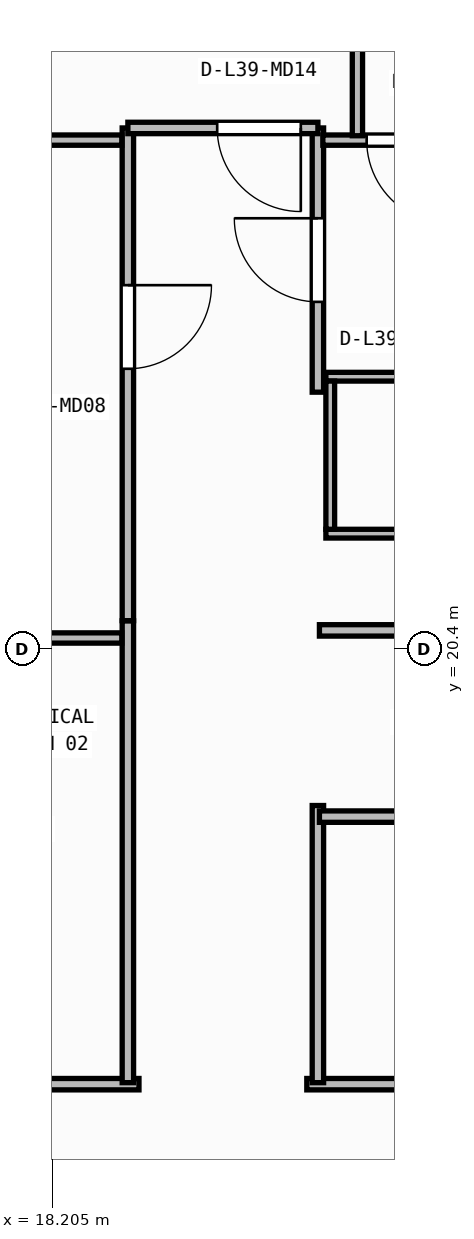
"""IFC4 building model, lengths in metres.
Left out: names, types, materials, properties, quantities, classifications, styles, units other than length and angle.
Written with IfcOpenShell. Run it as: python <this file> out.ifc"""

import sys

from ifc_helpers import new_model, si_unit, direction, frame, frame_2d, origin, place, context, subcontext, project, spatial, rectangle, extrude, element, fill, save


model = new_model("IFC4")
c1 = context("Model", 3, precision=1e-05, world=origin(), true_north=direction((0.0, 1.0)))
c2 = subcontext(c1, "Body", "Model", "MODEL_VIEW")
j1 = project(units=[si_unit("LENGTHUNIT", "METRE"), si_unit("PLANEANGLEUNIT", "RADIAN")], contexts=[c1])
p1 = place(None, origin())
s1 = spatial("IfcSite", under=j1, at=p1, CompositionType="ELEMENT")
p2 = place(p1, origin())
s2 = spatial("IfcBuilding", under=s1, at=p2, CompositionType="ELEMENT")
p3 = place(p2, frame((0.0, 0.0, 158.65)))
s3 = spatial("IfcBuildingStorey", under=s2, at=p3, CompositionType="ELEMENT", Elevation=158.65)
for number, where, z_axis, x_axis in (
    (1, (21.805, 21.923, 0.0), (0.0, 0.0, 1.0), (1.0, 0.0, 0.0)),
    (2, (21.805, 23.988, 0.0), (0.0, 0.0, 1.0), (1.0, 0.0, 0.0)),
):
    element("IfcWall", number, at=place(p3, frame(where, z_axis=z_axis, x_axis=x_axis)), inside=s3, PredefinedType="PARTITIONING", context=c2, shape_type="SweptSolid", body=[
        extrude(rectangle(XDim=2.15, YDim=0.115, at=frame_2d((1.075, 0.0))), origin(), (0.0, 0.0, 1.0), 3.71),
    ])
p4 = place(p3, frame((21.863, 21.98, 0.0), z_axis=(0.0, 0.0, 1.0), x_axis=(0.0, 1.0, 0.0)))
e3 = element("IfcWall", 3, at=p4, inside=s3, PredefinedType="PARTITIONING", context=c2, shape_type="SweptSolid", body=[
    extrude(rectangle(XDim=1.95, YDim=0.115, at=frame_2d((0.975, 0.0))), origin(), (0.0, 0.0, 1.0), 3.71),
])
p5 = place(p3, frame((19.346, 14.68, 0.0), z_axis=(0.0, 0.0, 1.0), x_axis=(-1.0, 0.0, 0.0)))
e4 = element("IfcWall", 4, at=p5, inside=s3, PredefinedType="PARTITIONING", context=c2, shape_type="SweptSolid", body=[
    extrude(rectangle(XDim=5.048, YDim=0.15, at=frame_2d((2.524, 0.0))), origin(), (0.0, 0.0, 1.0), 3.71),
])
p6 = place(p5, frame((1.974, 0.0, 0.0)))
e5 = element("IfcOpeningElement", 5, at=p6, cuts=e4, PredefinedType="OPENING", context=c2, shape_type="SweptSolid", body=[
    extrude(rectangle(XDim=1.1, YDim=2.1, at=frame_2d((0.55, 1.05))), frame((0.0, 0.085, 0.0), z_axis=(0.0, -1.0, 0.0), x_axis=(1.0, 0.0, 0.0)), (0.0, 0.0, 1.0), 0.17),
])
p7 = place(p3, frame((32.006, 14.68, 0.0), z_axis=(0.0, 0.0, 1.0), x_axis=(-1.0, 0.0, 0.0)))
e6 = element("IfcWall", 6, at=p7, inside=s3, PredefinedType="PARTITIONING", context=c2, shape_type="SweptSolid", body=[
    extrude(rectangle(XDim=10.452, YDim=0.15, at=frame_2d((5.226, 0.0))), origin(), (0.0, 0.0, 1.0), 3.71),
])
p8 = place(p7, frame((4.676, 0.0, 0.0)))
e7 = element("IfcOpeningElement", 7, at=p8, cuts=e6, PredefinedType="OPENING", context=c2, shape_type="SweptSolid", body=[
    extrude(rectangle(XDim=1.1, YDim=2.1, at=frame_2d((0.55, 1.05))), frame((0.0, 0.085, 0.0), z_axis=(0.0, -1.0, 0.0), x_axis=(1.0, 0.0, 0.0)), (0.0, 0.0, 1.0), 0.17),
])
p9 = place(p3, frame((19.2, 20.776, 0.0), z_axis=(0.0, 0.0, 1.0), x_axis=(0.0, -1.0, 0.0)))
e8 = element("IfcWall", 8, at=p9, inside=s3, PredefinedType="PARTITIONING", context=c2, shape_type="SweptSolid", body=[
    extrude(rectangle(XDim=6.076, YDim=0.15, at=frame_2d((3.038, 0.0))), origin(), (0.0, 0.0, 1.0), 3.71),
])
p10 = place(p3, frame((21.7, 14.7, 0.0), z_axis=(0.0, 0.0, 1.0), x_axis=(0.0, 1.0, 0.0)))
e9 = element("IfcWall", 9, at=p10, inside=s3, PredefinedType="PARTITIONING", context=c2, shape_type="SweptSolid", body=[
    extrude(rectangle(XDim=3.646, YDim=0.15, at=frame_2d((1.823, 0.0))), origin(), (0.0, 0.0, 1.0), 3.71),
])
p11 = place(p3, frame((19.2, 27.26, 0.0), z_axis=(0.0, 0.0, 1.0), x_axis=(0.0, -1.0, 0.0)))
e10 = element("IfcWall", 10, at=p11, inside=s3, PredefinedType="PARTITIONING", context=c2, shape_type="SweptSolid", body=[
    extrude(rectangle(XDim=6.482, YDim=0.15, at=frame_2d((3.241, 0.0))), origin(), (0.0, 0.0, 1.0), 3.71),
])
p12 = place(p11, frame((2.068, 0.0, 0.0)))
e11 = element("IfcOpeningElement", 11, at=p12, cuts=e10, PredefinedType="OPENING", context=c2, shape_type="SweptSolid", body=[
    extrude(rectangle(XDim=1.1, YDim=2.1, at=frame_2d((0.55, 1.05))), frame((0.0, 0.085, 0.0), z_axis=(0.0, -1.0, 0.0), x_axis=(1.0, 0.0, 0.0)), (0.0, 0.0, 1.0), 0.17),
])
p13 = place(p3, frame((21.7, 23.784, 0.0), z_axis=(0.0, 0.0, 1.0), x_axis=(0.0, 1.0, 0.0)))
e12 = element("IfcWall", 12, at=p13, inside=s3, PredefinedType="PARTITIONING", context=c2, shape_type="SweptSolid", body=[
    extrude(rectangle(XDim=3.476, YDim=0.15, at=frame_2d((1.738, 0.0))), origin(), (0.0, 0.0, 1.0), 3.71),
])
p14 = place(p13, frame((1.188, 0.0, 0.0)))
e13 = element("IfcOpeningElement", 13, at=p14, cuts=e12, PredefinedType="OPENING", context=c2, shape_type="SweptSolid", body=[
    extrude(rectangle(XDim=1.1, YDim=2.1, at=frame_2d((0.55, 1.05))), frame((0.0, 0.085, 0.0), z_axis=(0.0, -1.0, 0.0), x_axis=(1.0, 0.0, 0.0)), (0.0, 0.0, 1.0), 0.17),
])
p15 = place(p3, frame((21.7, 27.26, 0.0), z_axis=(0.0, 0.0, 1.0), x_axis=(-1.0, 0.0, 0.0)))
e14 = element("IfcWall", 14, at=p15, inside=s3, PredefinedType="PARTITIONING", context=c2, shape_type="SweptSolid", body=[
    extrude(rectangle(XDim=2.5, YDim=0.15, at=frame_2d((1.25, 0.0))), origin(), (0.0, 0.0, 1.0), 3.71),
])
p16 = place(p15, frame((0.225, 0.0, 0.0)))
e15 = element("IfcOpeningElement", 15, at=p16, cuts=e14, PredefinedType="OPENING", context=c2, shape_type="SweptSolid", body=[
    extrude(rectangle(XDim=1.1, YDim=2.1, at=frame_2d((0.55, 1.05))), frame((0.0, 0.085, 0.0), z_axis=(0.0, -1.0, 0.0), x_axis=(1.0, 0.0, 0.0)), (0.0, 0.0, 1.0), 0.17),
])
p17 = place(p3, frame((21.72, 18.2, 0.0), z_axis=(0.0, 0.0, 1.0), x_axis=(1.0, 0.0, 0.0)))
e16 = element("IfcWall", 16, at=p17, inside=s3, PredefinedType="PARTITIONING", context=c2, shape_type="SweptSolid", body=[
    extrude(rectangle(XDim=10.286, YDim=0.15, at=frame_2d((5.143, 0.0))), origin(), (0.0, 0.0, 1.0), 3.71),
])
p18 = place(p3, frame((27.256, 20.65, 0.0), z_axis=(0.0, 0.0, 1.0), x_axis=(-1.0, 0.0, 0.0)))
e17 = element("IfcWall", 17, at=p18, inside=s3, PredefinedType="PARTITIONING", context=c2, shape_type="SweptSolid", body=[
    extrude(rectangle(XDim=5.536, YDim=0.15, at=frame_2d((2.768, 0.0))), origin(), (0.0, 0.0, 1.0), 3.083),
])
p19 = place(p3, frame((19.12, 20.55, 0.0), z_axis=(0.0, 0.0, 1.0), x_axis=(-1.0, 0.0, 0.0)))
e18 = element("IfcWall", 18, at=p19, inside=s3, PredefinedType="PARTITIONING", context=c2, shape_type="SweptSolid", body=[
    extrude(rectangle(XDim=4.993, YDim=0.135, at=frame_2d((2.496, 0.0))), origin(), (0.0, 0.0, 1.0), 3.083),
])
p20 = place(p3, frame((19.12, 27.1, 0.0), z_axis=(0.0, 0.0, 1.0), x_axis=(-1.0, 0.0, 0.0)))
e19 = element("IfcWall", 19, at=p20, inside=s3, PredefinedType="PARTITIONING", context=c2, shape_type="SweptSolid", body=[
    extrude(rectangle(XDim=2.67, YDim=0.135, at=frame_2d((1.335, 0.0))), origin(), (0.0, 0.0, 1.0), 3.71),
])
p21 = place(p3, frame((27.03, 27.1, 0.0), z_axis=(0.0, 0.0, 1.0), x_axis=(-1.0, 0.0, 0.0)))
e20 = element("IfcWall", 20, at=p21, inside=s3, PredefinedType="PARTITIONING", context=c2, shape_type="SweptSolid", body=[
    extrude(rectangle(XDim=5.265, YDim=0.135, at=frame_2d((2.633, 0.0))), origin(), (0.0, 0.0, 1.0), 3.71),
])
p22 = place(p21, frame((3.588, 0.0, 0.0)))
e21 = element("IfcOpeningElement", 21, at=p22, cuts=e20, PredefinedType="OPENING", context=c2, shape_type="SweptSolid", body=[
    extrude(rectangle(XDim=1.1, YDim=2.1, at=frame_2d((0.55, 1.05))), frame((0.0, 0.077, 0.0), z_axis=(0.0, -1.0, 0.0), x_axis=(1.0, 0.0, 0.0)), (0.0, 0.0, 1.0), 0.155),
])
p23 = place(p3, frame((22.22, 27.157, 0.0), z_axis=(0.0, 0.0, 1.0), x_axis=(0.0, 1.0, 0.0)))
e22 = element("IfcWall", 22, at=p23, inside=s3, PredefinedType="PARTITIONING", context=c2, shape_type="SweptSolid", body=[
    extrude(rectangle(XDim=5.29, YDim=0.135, at=frame_2d((2.645, 0.0))), origin(), (0.0, 0.0, 1.0), 3.71),
])
p24 = place(p12, origin())
e23 = element("IfcDoor", 23, at=p24, inside=s3, OperationType="SINGLE_SWING_LEFT", PredefinedType="DOOR", context=c2, shape_type="SweptSolid", body=[
    extrude(rectangle(XDim=1.1, YDim=2.1, at=frame_2d((0.55, 1.05))), frame((0.0, 0.025, 0.0), z_axis=(0.0, -1.0, 0.0), x_axis=(1.0, 0.0, 0.0)), (0.0, 0.0, 1.0), 0.05),
])
fill(e11, e23)
p25 = place(p14, origin())
e24 = element("IfcDoor", 24, at=p25, inside=s3, OperationType="SINGLE_SWING_RIGHT", PredefinedType="DOOR", context=c2, shape_type="SweptSolid", body=[
    extrude(rectangle(XDim=1.1, YDim=2.1, at=frame_2d((0.55, 1.05))), frame((0.0, 0.025, 0.0), z_axis=(0.0, -1.0, 0.0), x_axis=(1.0, 0.0, 0.0)), (0.0, 0.0, 1.0), 0.05),
])
fill(e13, e24)
p26 = place(p16, origin())
e25 = element("IfcDoor", 25, at=p26, inside=s3, OperationType="SINGLE_SWING_LEFT", PredefinedType="DOOR", context=c2, shape_type="SweptSolid", body=[
    extrude(rectangle(XDim=1.1, YDim=2.1, at=frame_2d((0.55, 1.05))), frame((0.0, 0.025, 0.0), z_axis=(0.0, -1.0, 0.0), x_axis=(1.0, 0.0, 0.0)), (0.0, 0.0, 1.0), 0.05),
])
fill(e15, e25)
p27 = place(p22, origin())
e26 = element("IfcDoor", 26, at=p27, inside=s3, OperationType="SINGLE_SWING_LEFT", PredefinedType="DOOR", context=c2, shape_type="SweptSolid", body=[
    extrude(rectangle(XDim=1.1, YDim=2.1, at=frame_2d((0.55, 1.05))), frame((0.0, 0.025, 0.0), z_axis=(0.0, -1.0, 0.0), x_axis=(1.0, 0.0, 0.0)), (0.0, 0.0, 1.0), 0.05),
])
fill(e21, e26)
save(model, sys.argv[1])
